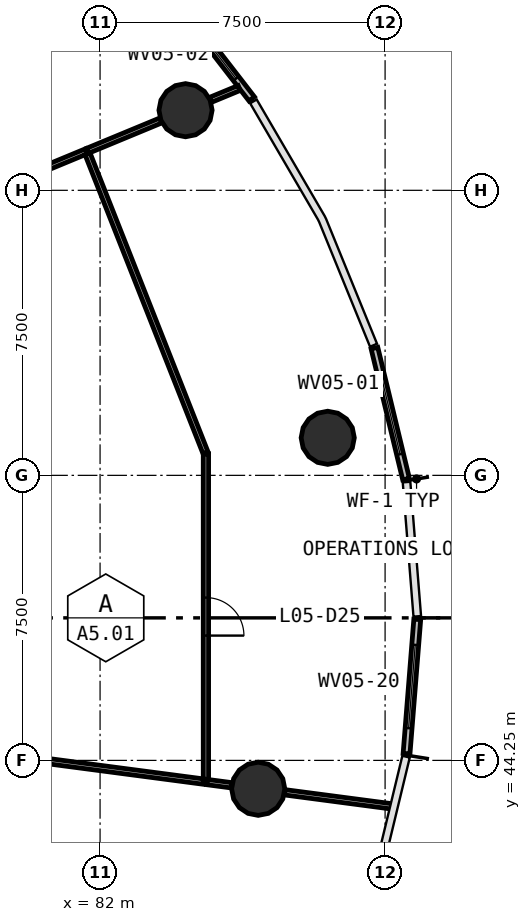
"""IFC4 building model, lengths in metres.
Left out: names, types, materials, properties, quantities, classifications, styles, units other than length and angle.
Written with IfcOpenShell. Run it as: python <this file> out.ifc"""

import sys

from ifc_helpers import new_model, si_unit, direction, frame, frame_2d, origin, origin_2d, place, context, subcontext, project, spatial, rectangle, circle, extrude, source, transform, mapped, element, fill, save


model = new_model("IFC4")
c1 = context("Model", 3, precision=1e-05, world=origin(), true_north=direction((0.0, 1.0)))
c2 = subcontext(c1, "Body", "Model", "MODEL_VIEW")
j1 = project(units=[si_unit("LENGTHUNIT", "METRE"), si_unit("PLANEANGLEUNIT", "RADIAN")], contexts=[c1])
p1 = place(None, origin())
s1 = spatial("IfcSite", under=j1, at=p1, CompositionType="ELEMENT")
p2 = place(p1, origin())
s2 = spatial("IfcBuilding", under=s1, at=p2, CompositionType="ELEMENT")
p3 = place(p2, frame((0.0, 0.0, 22.6)))
s3 = spatial("IfcBuildingStorey", under=s2, at=p3, CompositionType="ELEMENT", Elevation=22.6)
m1 = source(origin(), c2, "Body", "SweptSolid", [
    extrude(circle(Radius=0.7, at=origin_2d()), origin(), (0.0, 0.0, 1.0), 4.4),
])
for number, where, z_axis, x_axis in (
    (1, (87.99, 52.738, 0.0), (0.0, 0.0, 1.0), (1.0, 0.0, 0.0)),
    (2, (84.249, 61.358, 0.0), (0.0, 0.0, 1.0), (1.0, 0.0, 0.0)),
    (3, (86.161, 43.503, 0.0), (0.0, 0.0, 1.0), (1.0, 0.0, 0.0)),
):
    element("IfcColumn", number, at=place(p3, frame(where, z_axis=z_axis, x_axis=x_axis)), inside=s3, PredefinedType="COLUMN", context=c2, shape_type="MappedRepresentation", body=[
        mapped(m1, transform((0.0, 0.0, 0.0), scale=1.0)),
    ])
p4 = place(p3, frame((90.052, 51.652, 0.0), z_axis=(0.0, 0.0, 1.0), x_axis=(-0.234602378519, 0.972091417508, 0.0)))
e4 = element("IfcWall", 4, at=p4, inside=s3, PredefinedType="STANDARD", context=c2, shape_type="SweptSolid", body=[
    extrude(rectangle(XDim=3.544, YDim=0.18, at=frame_2d((1.772, 0.0))), origin(), (0.0, 0.0, 1.0), 3.698),
])
p5 = place(p4, frame((0.672, 0.0, 0.9)))
e5 = element("IfcOpeningElement", 5, at=p5, cuts=e4, PredefinedType="OPENING", context=c2, shape_type="SweptSolid", body=[
    extrude(rectangle(XDim=2.2, YDim=2.2, at=frame_2d((1.1, 1.1))), frame((0.0, 0.1, 0.0), z_axis=(0.0, -1.0, 0.0), x_axis=(1.0, 0.0, 0.0)), (0.0, 0.0, 1.0), 0.2),
])
p6 = place(p3, frame((85.99, 61.656, 0.0), z_axis=(0.0, 0.0, 1.0), x_axis=(-0.611755109176, 0.791047208703, 0.0)))
e6 = element("IfcWall", 6, at=p6, inside=s3, PredefinedType="STANDARD", context=c2, shape_type="SweptSolid", body=[
    extrude(rectangle(XDim=3.546, YDim=0.18, at=frame_2d((1.773, 0.0))), origin(), (0.0, 0.0, 1.0), 3.698),
])
p7 = place(p6, frame((0.673, 0.0, 0.9)))
e7 = element("IfcOpeningElement", 7, at=p7, cuts=e6, PredefinedType="OPENING", context=c2, shape_type="SweptSolid", body=[
    extrude(rectangle(XDim=2.2, YDim=2.2, at=frame_2d((1.1, 1.1))), frame((0.0, 0.1, 0.0), z_axis=(0.0, -1.0, 0.0), x_axis=(1.0, 0.0, 0.0)), (0.0, 0.0, 1.0), 0.2),
])
p8 = place(p3, frame((90.064, 44.427, 0.0), z_axis=(0.0, 0.0, 1.0), x_axis=(0.079624764611, 0.996824907825, 0.0)))
e8 = element("IfcWall", 8, at=p8, inside=s3, PredefinedType="STANDARD", context=c2, shape_type="SweptSolid", body=[
    extrude(rectangle(XDim=3.544, YDim=0.18, at=frame_2d((1.772, 0.0))), origin(), (0.0, 0.0, 1.0), 3.95),
])
p9 = place(p8, frame((0.672, 0.0, 0.9)))
e9 = element("IfcOpeningElement", 9, at=p9, cuts=e8, PredefinedType="OPENING", context=c2, shape_type="SweptSolid", body=[
    extrude(rectangle(XDim=2.2, YDim=2.2, at=frame_2d((1.1, 1.1))), frame((0.0, 0.1, 0.0), z_axis=(0.0, -1.0, 0.0), x_axis=(1.0, 0.0, 0.0)), (0.0, 0.0, 1.0), 0.2),
])
p10 = place(p3, frame((73.106, 56.742, 0.0), z_axis=(0.0, 0.0, 1.0), x_axis=(0.923866773136, 0.382714234769, 0.0)))
e10 = element("IfcWall", 10, at=p10, inside=s3, PredefinedType="PARTITIONING", context=c2, shape_type="SweptSolid", body=[
    extrude(rectangle(XDim=9.241, YDim=0.14, at=frame_2d((4.621, 0.0))), origin(), (0.0, 0.0, 1.0), 3.05),
])
p11 = place(p3, frame((84.785, 52.316, 0.0), z_axis=(0.0, 0.0, 1.0), x_axis=(0.0, -1.0, 0.0)))
e11 = element("IfcWall", 11, at=p11, inside=s3, PredefinedType="PARTITIONING", context=c2, shape_type="SweptSolid", body=[
    extrude(rectangle(XDim=8.633, YDim=0.14, at=frame_2d((4.316, 0.0))), origin(), (0.0, 0.0, 1.0), 3.05),
])
p12 = place(p11, frame((3.783, 0.0, 0.0)))
e12 = element("IfcOpeningElement", 12, at=p12, cuts=e11, PredefinedType="OPENING", context=c2, shape_type="SweptSolid", body=[
    extrude(rectangle(XDim=1.0, YDim=2.1, at=frame_2d((0.5, 1.05))), frame((0.0, 0.08, 0.0), z_axis=(0.0, -1.0, 0.0), x_axis=(1.0, 0.0, 0.0)), (0.0, 0.0, 1.0), 0.16),
])
p13 = place(p3, frame((84.774, 52.344, 0.0), z_axis=(0.0, 0.0, 1.0), x_axis=(-0.36705286117, 0.930200084448, 0.0)))
e13 = element("IfcWall", 13, at=p13, inside=s3, PredefinedType="PARTITIONING", context=c2, shape_type="SweptSolid", body=[
    extrude(rectangle(XDim=8.46, YDim=0.14, at=frame_2d((4.23, 0.0))), origin(), (0.0, 0.0, 1.0), 3.05),
])
p14 = place(p3, frame((76.761, 44.74, 0.0), z_axis=(0.0, 0.0, 1.0), x_axis=(0.991445281649, -0.130522999877, 0.0)))
e14 = element("IfcWall", 14, at=p14, inside=s3, PredefinedType="PARTITIONING", context=c2, shape_type="SweptSolid", body=[
    extrude(rectangle(XDim=8.022, YDim=0.14, at=frame_2d((4.011, 0.0))), origin(), (0.0, 0.0, 1.0), 3.05),
])
p15 = place(p3, frame((86.859, 43.411, 0.0), z_axis=(0.0, 0.0, 1.0), x_axis=(0.991443227873, -0.130538599287, 0.0)))
e15 = element("IfcWall", 15, at=p15, inside=s3, PredefinedType="PARTITIONING", context=c2, shape_type="SweptSolid", body=[
    extrude(rectangle(XDim=2.854, YDim=0.14, at=frame_2d((1.427, 0.0))), origin(), (0.0, 0.0, 1.0), 3.05),
])
p16 = place(p3, frame((81.671, 60.29, 0.0), z_axis=(0.0, 0.0, 1.0), x_axis=(0.923902679831, 0.382627545012, 0.0)))
e16 = element("IfcWall", 16, at=p16, inside=s3, PredefinedType="PARTITIONING", context=c2, shape_type="SweptSolid", body=[
    extrude(rectangle(XDim=2.085, YDim=0.14, at=frame_2d((1.042, 0.0))), origin(), (0.0, 0.0, 1.0), 3.05),
])
p17 = place(p3, frame((84.9, 61.628, 0.0), z_axis=(0.0, 0.0, 1.0), x_axis=(0.923846977396, 0.382762017913, 0.0)))
e17 = element("IfcWall", 17, at=p17, inside=s3, PredefinedType="PARTITIONING", context=c2, shape_type="SweptSolid", body=[
    extrude(rectangle(XDim=0.823, YDim=0.14, at=frame_2d((0.412, 0.0))), origin(), (0.0, 0.0, 1.0), 3.05),
])
p18 = place(p3, frame((84.815, 43.68, 0.0), z_axis=(0.0, 0.0, 1.0), x_axis=(0.991458111103, -0.130425511035, 0.0)))
e18 = element("IfcWall", 18, at=p18, inside=s3, PredefinedType="PARTITIONING", context=c2, shape_type="SweptSolid", body=[
    extrude(rectangle(XDim=0.653, YDim=0.14, at=frame_2d((0.327, 0.0))), origin(), (0.0, 0.0, 1.0), 3.05),
])
m2 = source(origin(), c2, "Body", "SweptSolid", [
    extrude(rectangle(XDim=2.2, YDim=2.2, at=frame_2d((1.1, 1.1))), frame((0.0, 0.03, 0.0), z_axis=(0.0, -1.0, 0.0), x_axis=(1.0, 0.0, 0.0)), (0.0, 0.0, 1.0), 0.06),
])
p19 = place(p5, origin())
e19 = element("IfcWindow", 19, at=p19, inside=s3, PartitioningType="SINGLE_PANEL", PredefinedType="WINDOW", context=c2, shape_type="MappedRepresentation", body=[
    mapped(m2, transform((0.0, 0.0, 0.0), scale=1.0)),
])
fill(e5, e19)
p20 = place(p7, origin())
e20 = element("IfcWindow", 20, at=p20, inside=s3, PartitioningType="SINGLE_PANEL", PredefinedType="WINDOW", context=c2, shape_type="MappedRepresentation", body=[
    mapped(m2, transform((0.0, 0.0, 0.0), scale=1.0)),
])
fill(e7, e20)
p21 = place(p9, origin())
e21 = element("IfcWindow", 21, at=p21, inside=s3, PartitioningType="SINGLE_PANEL", PredefinedType="WINDOW", context=c2, shape_type="MappedRepresentation", body=[
    mapped(m2, transform((0.0, 0.0, 0.0), scale=1.0)),
])
fill(e9, e21)
m3 = source(origin(), c2, "Body", "SweptSolid", [
    extrude(rectangle(XDim=1.0, YDim=2.1, at=frame_2d((0.5, 1.05))), frame((0.0, 0.025, 0.0), z_axis=(0.0, -1.0, 0.0), x_axis=(1.0, 0.0, 0.0)), (0.0, 0.0, 1.0), 0.05),
])
p22 = place(p12, origin())
e22 = element("IfcDoor", 22, at=p22, inside=s3, OperationType="SINGLE_SWING_RIGHT", PredefinedType="DOOR", context=c2, shape_type="MappedRepresentation", body=[
    mapped(m3, transform((0.0, 0.0, 0.0), scale=1.0)),
])
fill(e12, e22)
save(model, sys.argv[1])
